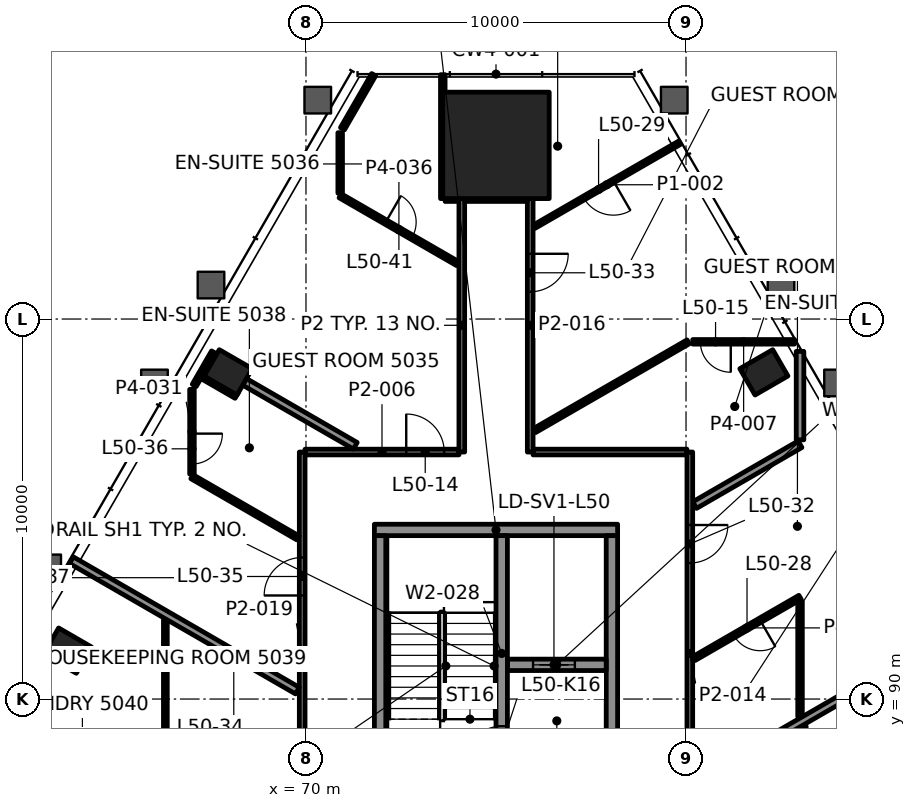
"""IFC4 building model, lengths in metres.
Left out: names, types, materials, properties, quantities, classifications, styles, units other than length and angle.
Written with IfcOpenShell. Run it as: python <this file> out.ifc"""

import sys

from ifc_helpers import new_model, si_unit, direction, frame, frame_2d, origin, origin_2d, place, context, subcontext, project, spatial, rectangle, hollow_rectangle, extrude, element, fill, save


model = new_model("IFC4")
c1 = context("Model", 3, precision=1e-05, world=origin(), true_north=direction((0.0, 1.0)))
c2 = subcontext(c1, "Body", "Model", "MODEL_VIEW")
j1 = project(units=[si_unit("LENGTHUNIT", "METRE"), si_unit("PLANEANGLEUNIT", "RADIAN")], contexts=[c1])
p1 = place(None, origin())
s1 = spatial("IfcSite", under=j1, at=p1, CompositionType="ELEMENT")
p2 = place(p1, origin())
s2 = spatial("IfcBuilding", under=s1, at=p2, CompositionType="ELEMENT")
p3 = place(p2, frame((0.0, 0.0, 214.3)))
s3 = spatial("IfcBuildingStorey", under=s2, at=p3, CompositionType="ELEMENT", Elevation=214.3)
p4 = place(p3, frame((75.0, 104.57, 0.0), z_axis=(0.0, 0.0, 1.0), x_axis=(-1.0, 0.0, 0.0)))
e1 = element("IfcColumn", 1, at=p4, inside=s3, PredefinedType="COLUMN", context=c2, shape_type="SweptSolid", body=[
    extrude(rectangle(XDim=2.8, YDim=2.8, at=origin_2d()), origin(), (0.0, 0.0, 1.0), 3.9),
])
for number, where, z_axis, x_axis in (
    (2, (82.048, 98.597, -0.0), (0.0, 0.0, 1.0), (-0.5, 0.866, 0.0)),
    (3, (67.952, 98.597, -0.0), (0.0, 0.0, 1.0), (-0.5, -0.866, 0.0)),
    (4, (63.724, 91.274, -0.0), (0.0, 0.0, 1.0), (-0.5, -0.866, 0.0)),
):
    element("IfcColumn", number, at=place(p3, frame(where, z_axis=z_axis, x_axis=x_axis)), inside=s3, PredefinedType="COLUMN", context=c2, shape_type="SweptSolid", body=[
        extrude(hollow_rectangle(XDim=0.8, YDim=1.0, WallThickness=0.05, at=origin_2d()), origin(), (0.0, 0.0, 1.0), 3.9),
    ])
p5 = place(p3, frame((71.8, 94.45, 0.0), z_axis=(0.0, 0.0, 1.0), x_axis=(1.0, 0.0, 0.0)))
e5 = element("IfcWall", 5, at=p5, inside=s3, PredefinedType="SHEAR", context=c2, shape_type="SweptSolid", body=[
    extrude(rectangle(XDim=6.4, YDim=0.3, at=frame_2d((3.2, 0.0))), origin(), (0.0, 0.0, 1.0), 3.7),
])
for number, where, z_axis, x_axis in (
    (6, (71.95, 88.1, 0.0), (0.0, 0.0, 1.0), (0.0, 1.0, 0.0)),
    (7, (78.05, 88.1, 0.0), (0.0, 0.0, 1.0), (0.0, 1.0, 0.0)),
):
    element("IfcWall", number, at=place(p3, frame(where, z_axis=z_axis, x_axis=x_axis)), inside=s3, PredefinedType="SHEAR", context=c2, shape_type="SweptSolid", body=[
        extrude(rectangle(XDim=6.2, YDim=0.3, at=frame_2d((3.1, 0.0))), origin(), (0.0, 0.0, 1.0), 3.7),
    ])
p6 = place(p3, frame((75.3, 90.9, 0.0), z_axis=(0.0, 0.0, 1.0), x_axis=(1.0, 0.0, 0.0)))
e8 = element("IfcWall", 8, at=p6, inside=s3, PredefinedType="SHEAR", context=c2, shape_type="SweptSolid", body=[
    extrude(rectangle(XDim=2.6, YDim=0.3, at=frame_2d((1.3, 0.0))), origin(), (0.0, 0.0, 1.0), 3.7),
])
p7 = place(p6, frame((0.675, 0.0, 0.0)))
e9 = element("IfcOpeningElement", 9, at=p7, cuts=e8, PredefinedType="OPENING", context=c2, shape_type="SweptSolid", body=[
    extrude(rectangle(XDim=1.1, YDim=2.1, at=frame_2d((0.55, 1.05))), frame((0.0, 0.16, 0.0), z_axis=(0.0, -1.0, 0.0), x_axis=(1.0, 0.0, 0.0)), (0.0, 0.0, 1.0), 0.32),
])
p8 = place(p3, frame((75.15, 88.1, 0.0), z_axis=(0.0, 0.0, 1.0), x_axis=(0.0, 1.0, 0.0)))
e10 = element("IfcWall", 10, at=p8, inside=s3, PredefinedType="SHEAR", context=c2, shape_type="SweptSolid", body=[
    extrude(rectangle(XDim=6.2, YDim=0.3, at=frame_2d((3.1, 0.0))), origin(), (0.0, 0.0, 1.0), 3.7),
])
p9 = place(p8, frame((0.185, 0.0, 0.0)))
e11 = element("IfcOpeningElement", 11, at=p9, cuts=e10, PredefinedType="OPENING", context=c2, shape_type="SweptSolid", body=[
    extrude(rectangle(XDim=1.0, YDim=2.1, at=frame_2d((0.5, 1.05))), frame((0.0, 0.16, 0.0), z_axis=(0.0, -1.0, 0.0), x_axis=(1.0, 0.0, 0.0)), (0.0, 0.0, 1.0), 0.32),
])
p10 = place(p3, frame((69.975, 96.5, 0.0), z_axis=(0.0, 0.0, 1.0), x_axis=(1.0, 0.0, 0.0)))
e12 = element("IfcWall", 12, at=p10, inside=s3, PredefinedType="PARTITIONING", context=c2, shape_type="SweptSolid", body=[
    extrude(rectangle(XDim=4.05, YDim=0.15, at=frame_2d((2.025, 0.0))), origin(), (0.0, 0.0, 1.0), 3.1),
])
p11 = place(p10, frame((2.663, 0.0, 0.0)))
e13 = element("IfcOpeningElement", 13, at=p11, cuts=e12, PredefinedType="OPENING", context=c2, shape_type="SweptSolid", body=[
    extrude(rectangle(XDim=1.0, YDim=2.1, at=frame_2d((0.5, 1.05))), frame((0.0, 0.085, 0.0), z_axis=(0.0, -1.0, 0.0), x_axis=(1.0, 0.0, 0.0)), (0.0, 0.0, 1.0), 0.17),
])
p12 = place(p3, frame((75.975, 96.5, 0.0), z_axis=(0.0, 0.0, 1.0), x_axis=(1.0, 0.0, 0.0)))
e14 = element("IfcWall", 14, at=p12, inside=s3, PredefinedType="PARTITIONING", context=c2, shape_type="SweptSolid", body=[
    extrude(rectangle(XDim=4.049, YDim=0.15, at=frame_2d((2.025, 0.0))), origin(), (0.0, 0.0, 1.0), 3.1),
])
p13 = place(p3, frame((82.855, 99.4, 0.0), z_axis=(0.0, 0.0, 1.0), x_axis=(-1.0, 0.0, 0.0)))
e15 = element("IfcWall", 15, at=p13, inside=s3, PredefinedType="PARTITIONING", context=c2, shape_type="SweptSolid", body=[
    extrude(rectangle(XDim=2.678, YDim=0.12, at=frame_2d((1.339, 0.0))), origin(), (0.0, 0.0, 1.0), 3.1),
])
p14 = place(p13, frame((1.677, 0.0, 0.0)))
e16 = element("IfcOpeningElement", 16, at=p14, cuts=e15, PredefinedType="OPENING", context=c2, shape_type="SweptSolid", body=[
    extrude(rectangle(XDim=0.8, YDim=2.1, at=frame_2d((0.4, 1.05))), frame((0.0, 0.07, 0.0), z_axis=(0.0, -1.0, 0.0), x_axis=(1.0, 0.0, 0.0)), (0.0, 0.0, 1.0), 0.14),
])
p15 = place(p3, frame((73.66, 103.17, 0.0), z_axis=(0.0, 0.0, 1.0), x_axis=(1.0, 0.0, 0.0)))
e17 = element("IfcWall", 17, at=p15, inside=s3, PredefinedType="PARTITIONING", context=c2, shape_type="SweptSolid", body=[
    extrude(rectangle(XDim=0.365, YDim=0.15, at=frame_2d((0.182, 0.0))), origin(), (0.0, 0.0, 1.0), 3.1),
])
p16 = place(p3, frame((80.227, 87.782, 0.0), z_axis=(0.0, 0.0, 1.0), x_axis=(0.866028841934, 0.499994044904, 0.0)))
e18 = element("IfcWall", 18, at=p16, inside=s3, PredefinedType="PARTITIONING", context=c2, shape_type="SweptSolid", body=[
    extrude(rectangle(XDim=6.484, YDim=0.2, at=frame_2d((3.242, 0.0))), origin(), (0.0, 0.0, 1.0), 3.1),
])
p17 = place(p3, frame((83.0, 92.677, 0.0), z_axis=(0.0, 0.0, 1.0), x_axis=(-0.866029130051, -0.499993545862, 0.0)))
e19 = element("IfcWall", 19, at=p17, inside=s3, PredefinedType="PARTITIONING", context=c2, shape_type="SweptSolid", body=[
    extrude(rectangle(XDim=3.222, YDim=0.12, at=frame_2d((1.611, 0.0))), origin(), (0.0, 0.0, 1.0), 3.1),
])
p18 = place(p17, frame((1.211, 0.0, 0.0)))
e20 = element("IfcOpeningElement", 20, at=p18, cuts=e19, PredefinedType="OPENING", context=c2, shape_type="SweptSolid", body=[
    extrude(rectangle(XDim=0.8, YDim=2.1, at=frame_2d((0.4, 1.05))), frame((0.0, 0.07, 0.0), z_axis=(0.0, -1.0, 0.0), x_axis=(1.0, 0.0, 0.0)), (0.0, 0.0, 1.0), 0.14),
])
p19 = place(p3, frame((80.227, 95.104, 0.0), z_axis=(0.0, 0.0, 1.0), x_axis=(0.866029421769, 0.499993040581, 0.0)))
e21 = element("IfcWall", 21, at=p19, inside=s3, PredefinedType="PARTITIONING", context=c2, shape_type="SweptSolid", body=[
    extrude(rectangle(XDim=3.202, YDim=0.2, at=frame_2d((1.601, 0.0))), origin(), (0.0, 0.0, 1.0), 3.022),
])
p20 = place(p3, frame((76.01, 97.063, 0.0), z_axis=(0.0, 0.0, 1.0), x_axis=(0.866045536992, 0.499965126639, 0.0)))
e22 = element("IfcWall", 22, at=p20, inside=s3, PredefinedType="PARTITIONING", context=c2, shape_type="SweptSolid", body=[
    extrude(rectangle(XDim=4.674, YDim=0.12, at=frame_2d((2.337, 0.0))), origin(), (0.0, 0.0, 1.0), 3.1),
])
p21 = place(p3, frame((79.83, 104.639, 0.0), z_axis=(0.0, 0.0, 1.0), x_axis=(-0.866005358171, -0.500034718414, 0.0)))
e23 = element("IfcWall", 23, at=p21, inside=s3, PredefinedType="PARTITIONING", context=c2, shape_type="SweptSolid", body=[
    extrude(rectangle(XDim=4.422, YDim=0.1, at=frame_2d((2.211, 0.0))), origin(), (0.0, 0.0, 1.0), 3.1),
])
p22 = place(p21, frame((2.011, 0.0, 0.0)))
e24 = element("IfcOpeningElement", 24, at=p22, cuts=e23, PredefinedType="OPENING", context=c2, shape_type="SweptSolid", body=[
    extrude(rectangle(XDim=0.9, YDim=2.1, at=frame_2d((0.45, 1.05))), frame((0.0, 0.06, 0.0), z_axis=(0.0, -1.0, 0.0), x_axis=(1.0, 0.0, 0.0)), (0.0, 0.0, 1.0), 0.12),
])
p23 = place(p3, frame((67.06, 98.253, 0.0), z_axis=(0.0, 0.0, 1.0), x_axis=(0.499972622635, 0.866041209536, 0.0)))
e25 = element("IfcWall", 25, at=p23, inside=s3, PredefinedType="PARTITIONING", context=c2, shape_type="SweptSolid", body=[
    extrude(rectangle(XDim=1.014, YDim=0.12, at=frame_2d((0.507, 0.0))), origin(), (0.0, 0.0, 1.0), 3.1),
])
p24 = place(p3, frame((70.96, 105.008, 0.0), z_axis=(0.0, 0.0, 1.0), x_axis=(0.500057100911, 0.865992434048, 0.0)))
e26 = element("IfcWall", 26, at=p24, inside=s3, PredefinedType="PARTITIONING", context=c2, shape_type="SweptSolid", body=[
    extrude(rectangle(XDim=1.642, YDim=0.12, at=frame_2d((0.821, 0.0))), origin(), (0.0, 0.0, 1.0), 3.1),
])
p25 = place(p3, frame((83.1, 87.96, 0.0), z_axis=(0.0, 0.0, 1.0), x_axis=(0.0, 1.0, 0.0)))
e27 = element("IfcWall", 27, at=p25, inside=s3, PredefinedType="PARTITIONING", context=c2, shape_type="SweptSolid", body=[
    extrude(rectangle(XDim=1.325, YDim=0.12, at=frame_2d((0.663, 0.0))), origin(), (0.0, 0.0, 1.0), 3.1),
])
p26 = place(p3, frame((83.0, 89.538, 0.0), z_axis=(0.0, 0.0, 1.0), x_axis=(0.0, 1.0, 0.0)))
e28 = element("IfcWall", 28, at=p26, inside=s3, PredefinedType="PARTITIONING", context=c2, shape_type="SweptSolid", body=[
    extrude(rectangle(XDim=3.031, YDim=0.12, at=frame_2d((1.515, 0.0))), origin(), (0.0, 0.0, 1.0), 3.1),
])
p27 = place(p3, frame((83.0, 96.821, 0.0), z_axis=(0.0, 0.0, 1.0), x_axis=(0.0, 1.0, 0.0)))
e29 = element("IfcWall", 29, at=p27, inside=s3, PredefinedType="PARTITIONING", context=c2, shape_type="SweptSolid", body=[
    extrude(rectangle(XDim=2.328, YDim=0.2, at=frame_2d((1.164, 0.0))), origin(), (0.0, 0.0, 1.0), 3.022),
])
p28 = place(p3, frame((80.1, 96.5, 0.0), z_axis=(0.0, 0.0, 1.0), x_axis=(0.0, -1.0, 0.0)))
e30 = element("IfcWall", 30, at=p28, inside=s3, PredefinedType="PARTITIONING", context=c2, shape_type="SweptSolid", body=[
    extrude(rectangle(XDim=10.6, YDim=0.15, at=frame_2d((5.3, 0.0))), origin(), (0.0, 0.0, 1.0), 3.097),
])
p29 = place(p28, frame((1.92, 0.0, 0.0)))
e31 = element("IfcOpeningElement", 31, at=p29, cuts=e30, PredefinedType="OPENING", context=c2, shape_type="SweptSolid", body=[
    extrude(rectangle(XDim=1.0, YDim=2.1, at=frame_2d((0.5, 1.05))), frame((0.0, 0.085, 0.0), z_axis=(0.0, -1.0, 0.0), x_axis=(1.0, 0.0, 0.0)), (0.0, 0.0, 1.0), 0.17),
])
p30 = place(p3, frame((75.9, 103.169, 0.0), z_axis=(0.0, 0.0, 1.0), x_axis=(0.0, -1.0, 0.0)))
e32 = element("IfcWall", 32, at=p30, inside=s3, PredefinedType="PARTITIONING", context=c2, shape_type="SweptSolid", body=[
    extrude(rectangle(XDim=6.669, YDim=0.15, at=frame_2d((3.334, 0.0))), origin(), (0.0, 0.0, 1.0), 3.1),
])
p31 = place(p30, frame((1.452, 0.0, 0.0)))
e33 = element("IfcOpeningElement", 33, at=p31, cuts=e32, PredefinedType="OPENING", context=c2, shape_type="SweptSolid", body=[
    extrude(rectangle(XDim=1.0, YDim=2.1, at=frame_2d((0.5, 1.05))), frame((0.0, 0.085, 0.0), z_axis=(0.0, -1.0, 0.0), x_axis=(1.0, 0.0, 0.0)), (0.0, 0.0, 1.0), 0.17),
])
p32 = place(p3, frame((74.1, 96.5, 0.0), z_axis=(0.0, 0.0, 1.0), x_axis=(0.0, 1.0, 0.0)))
e34 = element("IfcWall", 34, at=p32, inside=s3, PredefinedType="PARTITIONING", context=c2, shape_type="SweptSolid", body=[
    extrude(rectangle(XDim=6.67, YDim=0.15, at=frame_2d((3.335, 0.0))), origin(), (0.0, 0.0, 1.0), 3.1),
])
p33 = place(p3, frame((73.6, 103.17, 0.0), z_axis=(0.0, 0.0, 1.0), x_axis=(0.0, 1.0, 0.0)))
e35 = element("IfcWall", 35, at=p33, inside=s3, PredefinedType="PARTITIONING", context=c2, shape_type="SweptSolid", body=[
    extrude(rectangle(XDim=3.26, YDim=0.12, at=frame_2d((1.63, 0.0))), origin(), (0.0, 0.0, 1.0), 3.1),
])
p34 = place(p3, frame((70.9, 103.312, 0.0), z_axis=(0.0, 0.0, 1.0), x_axis=(0.0, 1.0, 0.0)))
e36 = element("IfcWall", 36, at=p34, inside=s3, PredefinedType="PARTITIONING", context=c2, shape_type="SweptSolid", body=[
    extrude(rectangle(XDim=1.592, YDim=0.12, at=frame_2d((0.796, 0.0))), origin(), (0.0, 0.0, 1.0), 3.1),
])
p35 = place(p3, frame((69.9, 85.9, 0.0), z_axis=(0.0, 0.0, 1.0), x_axis=(0.0, 1.0, 0.0)))
e37 = element("IfcWall", 37, at=p35, inside=s3, PredefinedType="PARTITIONING", context=c2, shape_type="SweptSolid", body=[
    extrude(rectangle(XDim=10.6, YDim=0.15, at=frame_2d((5.3, 0.0))), origin(), (0.0, 0.0, 1.0), 3.097),
])
p36 = place(p35, frame((1.968, 0.0, 0.0)))
e38 = element("IfcOpeningElement", 38, at=p36, cuts=e37, PredefinedType="OPENING", context=c2, shape_type="SweptSolid", body=[
    extrude(rectangle(XDim=0.9, YDim=2.1, at=frame_2d((0.45, 1.05))), frame((0.0, 0.085, 0.0), z_axis=(0.0, -1.0, 0.0), x_axis=(1.0, 0.0, 0.0)), (0.0, 0.0, 1.0), 0.17),
])
p37 = place(p35, frame((6.825, 0.0, 0.0)))
e39 = element("IfcOpeningElement", 39, at=p37, cuts=e37, PredefinedType="OPENING", context=c2, shape_type="SweptSolid", body=[
    extrude(rectangle(XDim=1.0, YDim=2.1, at=frame_2d((0.5, 1.05))), frame((0.0, 0.085, 0.0), z_axis=(0.0, -1.0, 0.0), x_axis=(1.0, 0.0, 0.0)), (0.0, 0.0, 1.0), 0.17),
])
p38 = place(p3, frame((67.0, 98.149, 0.0), z_axis=(0.0, 0.0, 1.0), x_axis=(0.0, -1.0, 0.0)))
e40 = element("IfcWall", 40, at=p38, inside=s3, PredefinedType="PARTITIONING", context=c2, shape_type="SweptSolid", body=[
    extrude(rectangle(XDim=2.228, YDim=0.12, at=frame_2d((1.114, 0.0))), origin(), (0.0, 0.0, 1.0), 3.022),
])
p39 = place(p38, frame((1.164, 0.0, 0.0)))
e41 = element("IfcOpeningElement", 41, at=p39, cuts=e40, PredefinedType="OPENING", context=c2, shape_type="SweptSolid", body=[
    extrude(rectangle(XDim=0.8, YDim=2.1, at=frame_2d((0.4, 1.05))), frame((0.0, 0.07, 0.0), z_axis=(0.0, -1.0, 0.0), x_axis=(1.0, 0.0, 0.0)), (0.0, 0.0, 1.0), 0.14),
])
p40 = place(p3, frame((66.3, 88.624, 0.0), z_axis=(0.0, 0.0, 1.0), x_axis=(0.0, 1.0, 0.0)))
e42 = element("IfcWall", 42, at=p40, inside=s3, PredefinedType="PARTITIONING", context=c2, shape_type="SweptSolid", body=[
    extrude(rectangle(XDim=3.458, YDim=0.1, at=frame_2d((1.729, 0.0))), origin(), (0.0, 0.0, 1.0), 3.1),
])
p41 = place(p3, frame((70.9, 103.243, 0.0), z_axis=(0.0, 0.0, 1.0), x_axis=(0.866028357664, -0.499994883695, 0.0)))
e43 = element("IfcWall", 43, at=p41, inside=s3, PredefinedType="PARTITIONING", context=c2, shape_type="SweptSolid", body=[
    extrude(rectangle(XDim=3.568, YDim=0.12, at=frame_2d((1.784, 0.0))), origin(), (0.0, 0.0, 1.0), 3.1),
])
p42 = place(p41, frame((1.384, 0.0, 0.0)))
e44 = element("IfcOpeningElement", 44, at=p42, cuts=e43, PredefinedType="OPENING", context=c2, shape_type="SweptSolid", body=[
    extrude(rectangle(XDim=0.8, YDim=2.1, at=frame_2d((0.4, 1.05))), frame((0.0, 0.07, 0.0), z_axis=(0.0, -1.0, 0.0), x_axis=(1.0, 0.0, 0.0)), (0.0, 0.0, 1.0), 0.14),
])
p43 = place(p3, frame((71.298, 96.665, 0.0), z_axis=(0.0, 0.0, 1.0), x_axis=(-0.866023625329, 0.500003080363, 0.0)))
e45 = element("IfcWall", 45, at=p43, inside=s3, PredefinedType="PARTITIONING", context=c2, shape_type="SweptSolid", body=[
    extrude(rectangle(XDim=3.364, YDim=0.2, at=frame_2d((1.682, 0.0))), origin(), (0.0, 0.0, 1.0), 3.1),
])
p44 = place(p3, frame((68.185, 98.0, 0.0), z_axis=(0.0, 0.0, 1.0), x_axis=(-0.866071776036, 0.499919672301, 0.0)))
e46 = element("IfcWall", 46, at=p44, inside=s3, PredefinedType="PARTITIONING", context=c2, shape_type="SweptSolid", body=[
    extrude(rectangle(XDim=1.0, YDim=0.2, at=frame_2d((0.5, 0.0))), origin(), (0.0, 0.0, 1.0), 3.022),
])
p45 = place(p3, frame((69.79, 94.24, 0.0), z_axis=(0.0, 0.0, 1.0), x_axis=(-0.86604299788, 0.499969524894, 0.0)))
e47 = element("IfcWall", 47, at=p45, inside=s3, PredefinedType="PARTITIONING", context=c2, shape_type="SweptSolid", body=[
    extrude(rectangle(XDim=3.222, YDim=0.12, at=frame_2d((1.611, 0.0))), origin(), (0.0, 0.0, 1.0), 3.1),
])
p46 = place(p3, frame((69.773, 90.222, 0.0), z_axis=(0.0, 0.0, 1.0), x_axis=(-0.866032781393, 0.499987221389, 0.0)))
e48 = element("IfcWall", 48, at=p46, inside=s3, PredefinedType="PARTITIONING", context=c2, shape_type="SweptSolid", body=[
    extrude(rectangle(XDim=6.865, YDim=0.2, at=frame_2d((3.432, 0.0))), origin(), (0.0, 0.0, 1.0), 3.022),
])
p47 = place(p3, frame((74.175, 103.17, 0.0), z_axis=(0.0, 0.0, 1.0), x_axis=(1.0, 0.0, 0.0)))
e49 = element("IfcWall", 49, at=p47, inside=s3, PredefinedType="PARTITIONING", context=c2, shape_type="SweptSolid", body=[
    extrude(rectangle(XDim=1.649, YDim=0.15, at=frame_2d((0.825, 0.0))), origin(), (0.0, 0.0, 1.0), 3.097),
])
p48 = place(p11, origin())
e50 = element("IfcDoor", 50, at=p48, inside=s3, OperationType="SINGLE_SWING_RIGHT", PredefinedType="DOOR", context=c2, shape_type="SweptSolid", body=[
    extrude(rectangle(XDim=1.0, YDim=2.1, at=frame_2d((0.5, 1.05))), frame((0.0, 0.025, 0.0), z_axis=(0.0, -1.0, 0.0), x_axis=(1.0, 0.0, 0.0)), (0.0, 0.0, 1.0), 0.05),
])
fill(e13, e50)
p49 = place(p14, origin())
e51 = element("IfcDoor", 51, at=p49, inside=s3, OperationType="SINGLE_SWING_LEFT", PredefinedType="DOOR", context=c2, shape_type="SweptSolid", body=[
    extrude(rectangle(XDim=0.8, YDim=2.1, at=frame_2d((0.4, 1.05))), frame((0.0, 0.025, 0.0), z_axis=(0.0, -1.0, 0.0), x_axis=(1.0, 0.0, 0.0)), (0.0, 0.0, 1.0), 0.05),
])
fill(e16, e51)
p50 = place(p18, origin())
e52 = element("IfcDoor", 52, at=p50, inside=s3, OperationType="SINGLE_SWING_LEFT", PredefinedType="DOOR", context=c2, shape_type="SweptSolid", body=[
    extrude(rectangle(XDim=0.8, YDim=2.1, at=frame_2d((0.4, 1.05))), frame((0.0, 0.025, 0.0), z_axis=(0.0, -1.0, 0.0), x_axis=(1.0, 0.0, 0.0)), (0.0, 0.0, 1.0), 0.05),
])
fill(e20, e52)
p51 = place(p22, origin())
e53 = element("IfcDoor", 53, at=p51, inside=s3, OperationType="SINGLE_SWING_RIGHT", PredefinedType="DOOR", context=c2, shape_type="SweptSolid", body=[
    extrude(rectangle(XDim=0.9, YDim=2.1, at=frame_2d((0.45, 1.05))), frame((0.0, 0.025, 0.0), z_axis=(0.0, -1.0, 0.0), x_axis=(1.0, 0.0, 0.0)), (0.0, 0.0, 1.0), 0.05),
])
fill(e24, e53)
p52 = place(p29, origin())
e54 = element("IfcDoor", 54, at=p52, inside=s3, OperationType="SINGLE_SWING_RIGHT", PredefinedType="DOOR", context=c2, shape_type="SweptSolid", body=[
    extrude(rectangle(XDim=1.0, YDim=2.1, at=frame_2d((0.5, 1.05))), frame((0.0, 0.025, 0.0), z_axis=(0.0, -1.0, 0.0), x_axis=(1.0, 0.0, 0.0)), (0.0, 0.0, 1.0), 0.05),
])
fill(e31, e54)
p53 = place(p31, origin())
e55 = element("IfcDoor", 55, at=p53, inside=s3, OperationType="SINGLE_SWING_RIGHT", PredefinedType="DOOR", context=c2, shape_type="SweptSolid", body=[
    extrude(rectangle(XDim=1.0, YDim=2.1, at=frame_2d((0.5, 1.05))), frame((0.0, 0.025, 0.0), z_axis=(0.0, -1.0, 0.0), x_axis=(1.0, 0.0, 0.0)), (0.0, 0.0, 1.0), 0.05),
])
fill(e33, e55)
p54 = place(p37, origin())
e56 = element("IfcDoor", 56, at=p54, inside=s3, OperationType="SINGLE_SWING_RIGHT", PredefinedType="DOOR", context=c2, shape_type="SweptSolid", body=[
    extrude(rectangle(XDim=1.0, YDim=2.1, at=frame_2d((0.5, 1.05))), frame((0.0, 0.025, 0.0), z_axis=(0.0, -1.0, 0.0), x_axis=(1.0, 0.0, 0.0)), (0.0, 0.0, 1.0), 0.05),
])
fill(e39, e56)
p55 = place(p39, origin())
e57 = element("IfcDoor", 57, at=p55, inside=s3, OperationType="SINGLE_SWING_RIGHT", PredefinedType="DOOR", context=c2, shape_type="SweptSolid", body=[
    extrude(rectangle(XDim=0.8, YDim=2.1, at=frame_2d((0.4, 1.05))), frame((0.0, 0.025, 0.0), z_axis=(0.0, -1.0, 0.0), x_axis=(1.0, 0.0, 0.0)), (0.0, 0.0, 1.0), 0.05),
])
fill(e41, e57)
p56 = place(p42, origin())
e58 = element("IfcDoor", 58, at=p56, inside=s3, OperationType="SINGLE_SWING_RIGHT", PredefinedType="DOOR", context=c2, shape_type="SweptSolid", body=[
    extrude(rectangle(XDim=0.8, YDim=2.1, at=frame_2d((0.4, 1.05))), frame((0.0, 0.025, 0.0), z_axis=(0.0, -1.0, 0.0), x_axis=(1.0, 0.0, 0.0)), (0.0, 0.0, 1.0), 0.05),
])
fill(e44, e58)
p57 = place(p3, origin())
p58 = place(p57, frame((69.778, 104.05, 0.15), z_axis=(0.0, 0.0, 1.0), x_axis=(-0.5, -0.866025, 0.0)))
p59 = place(p58, origin())
e59 = element("IfcWindow", 59, at=p59, inside=s3, PartitioningType="SINGLE_PANEL", PredefinedType="WINDOW", context=c2, shape_type="SweptSolid", body=[
    extrude(rectangle(XDim=2.743, YDim=3.55, at=frame_2d((1.372, 1.775))), frame((0.0, 0.03, 0.0), z_axis=(0.0, -1.0, 0.0), x_axis=(1.0, 0.0, 0.0)), (0.0, 0.0, 1.0), 0.06),
])
p60 = place(p7, origin())
e60 = element("IfcDoor", 60, at=p60, inside=s3, OperationType="DOUBLE_DOOR_SLIDING", PredefinedType="DOOR", context=c2, shape_type="SweptSolid", body=[
    extrude(rectangle(XDim=1.1, YDim=2.1, at=frame_2d((0.55, 1.05))), frame((0.0, 0.025, 0.0), z_axis=(0.0, -1.0, 0.0), x_axis=(1.0, 0.0, 0.0)), (0.0, 0.0, 1.0), 0.05),
])
fill(e9, e60)
p61 = place(p9, origin())
e61 = element("IfcDoor", 61, at=p61, inside=s3, OperationType="SINGLE_SWING_LEFT", PredefinedType="DOOR", context=c2, shape_type="SweptSolid", body=[
    extrude(rectangle(XDim=1.0, YDim=2.1, at=frame_2d((0.5, 1.05))), frame((0.0, 0.025, 0.0), z_axis=(0.0, -1.0, 0.0), x_axis=(1.0, 0.0, 0.0)), (0.0, 0.0, 1.0), 0.05),
])
fill(e11, e61)
save(model, sys.argv[1])
